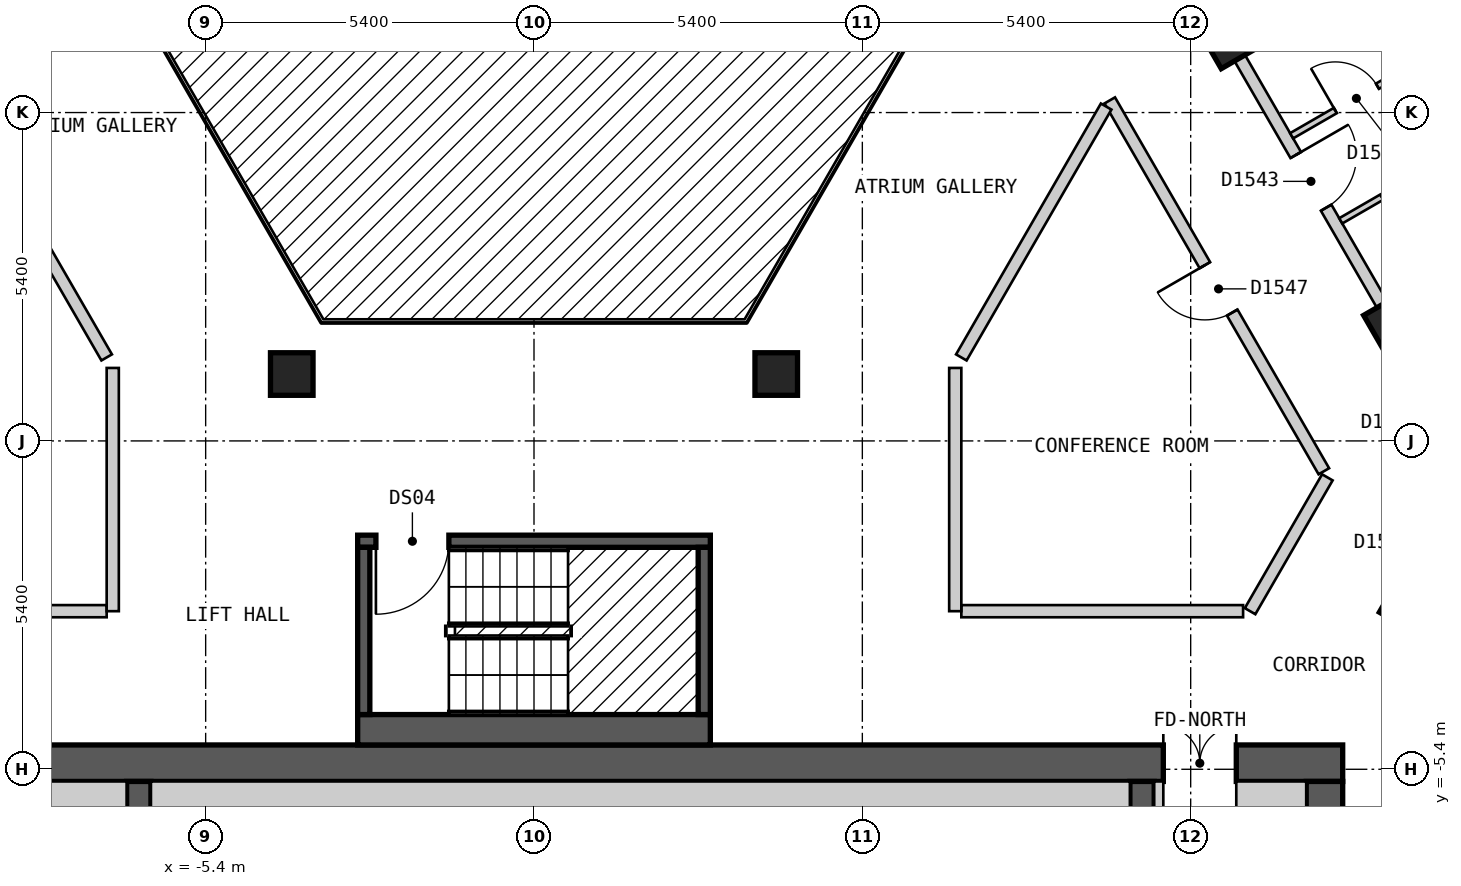
"""IFC4 building model, lengths in metres.
Left out: names, types, materials, properties, quantities, classifications, styles, units other than length and angle.
Written with IfcOpenShell. Run it as: python <this file> out.ifc"""

import sys

from ifc_helpers import new_model, si_unit, direction, frame, frame_2d, origin, origin_2d, place, context, subcontext, project, spatial, rectangle, extrude, element, fill, save


model = new_model("IFC4")
c1 = context("Model", 3, precision=1e-05, world=origin(), true_north=direction((0.0, 1.0)))
c2 = subcontext(c1, "Body", "Model", "MODEL_VIEW")
j1 = project(units=[si_unit("LENGTHUNIT", "METRE"), si_unit("PLANEANGLEUNIT", "RADIAN")], contexts=[c1])
p1 = place(None, origin())
s1 = spatial("IfcSite", under=j1, at=p1, CompositionType="ELEMENT")
p2 = place(p1, origin())
s2 = spatial("IfcBuilding", under=s1, at=p2, CompositionType="ELEMENT")
p3 = place(p2, frame((0.0, 0.0, 184.2)))
s3 = spatial("IfcBuildingStorey", under=s2, at=p3, CompositionType="ELEMENT", Elevation=184.2)
for number, where, z_axis, x_axis in (
    (1, (14.382, -2.689, 0.0), (0.0, 0.0, 1.0), (0.5, 0.866, 0.0)),
    (2, (14.123, 1.937, 0.0), (0.0, 0.0, 1.0), (-0.5, 0.866, 0.0)),
    (3, (3.984, 1.1, 0.0), (0.0, 0.0, 1.0), (1.0, 0.0, 0.0)),
    (4, (11.431, 6.6, 0.0), (0.0, 0.0, 1.0), (-0.5, 0.866, 0.0)),
    (5, (-3.984, 1.1, 0.0), (0.0, 0.0, 1.0), (1.0, 0.0, 0.0)),
):
    element("IfcColumn", number, at=place(p3, frame(where, z_axis=z_axis, x_axis=x_axis)), inside=s3, PredefinedType="COLUMN", context=c2, shape_type="SweptSolid", body=[
        extrude(rectangle(XDim=0.7, YDim=0.7, at=origin_2d()), origin(), (0.0, 0.0, 1.0), 3.0),
    ])
p4 = place(p3, frame((-13.3, -5.3, 0.0), z_axis=(0.0, 0.0, 1.0), x_axis=(1.0, 0.0, 0.0)))
e6 = element("IfcWall", 6, at=p4, inside=s3, PredefinedType="SHEAR", context=c2, shape_type="SweptSolid", body=[
    extrude(rectangle(XDim=26.6, YDim=0.6, at=frame_2d((13.3, 0.0))), origin(), (0.0, 0.0, 1.0), 2.7),
])
p5 = place(p4, frame((23.65, 0.0, 0.0)))
e7 = element("IfcOpeningElement", 7, at=p5, cuts=e6, PredefinedType="OPENING", context=c2, shape_type="SweptSolid", body=[
    extrude(rectangle(XDim=1.2, YDim=2.1, at=frame_2d((0.6, 1.05))), frame((0.0, 0.31, 0.0), z_axis=(0.0, -1.0, 0.0), x_axis=(1.0, 0.0, 0.0)), (0.0, 0.0, 1.0), 0.62),
])
p6 = place(p3, frame((13.0, -18.4, 0.0), z_axis=(0.0, 0.0, 1.0), x_axis=(0.0, 1.0, 0.0)))
e8 = element("IfcWall", 8, at=p6, inside=s3, PredefinedType="SHEAR", context=c2, shape_type="SweptSolid", body=[
    extrude(rectangle(XDim=12.8, YDim=0.6, at=frame_2d((6.4, 0.0))), origin(), (0.0, 0.0, 1.0), 2.7),
])
for number, where, z_axis, x_axis in (
    (9, (-6.5, -9.15, 0.0), (0.0, 0.0, 1.0), (0.0, 1.0, 0.0)),
    (10, (10.0, -9.15, 0.0), (0.0, 0.0, 1.0), (0.0, 1.0, 0.0)),
):
    element("IfcWall", number, at=place(p3, frame(where, z_axis=z_axis, x_axis=x_axis)), inside=s3, PredefinedType="SHEAR", context=c2, shape_type="SweptSolid", body=[
        extrude(rectangle(XDim=3.55, YDim=0.4, at=frame_2d((1.775, 0.0))), origin(), (0.0, 0.0, 1.0), 2.7),
    ])
p7 = place(p3, frame((-2.9, -4.75, 0.0), z_axis=(0.0, 0.0, 1.0), x_axis=(1.0, 0.0, 0.0)))
e11 = element("IfcWall", 11, at=p7, inside=s3, PredefinedType="SOLIDWALL", context=c2, shape_type="SweptSolid", body=[
    extrude(rectangle(XDim=5.8, YDim=0.5, at=frame_2d((2.9, 0.0))), origin(), (0.0, 0.0, 1.0), 2.7),
])
p8 = place(p3, frame((-2.9, -1.65, 0.0), z_axis=(0.0, 0.0, 1.0), x_axis=(1.0, 0.0, 0.0)))
e12 = element("IfcWall", 12, at=p8, inside=s3, PredefinedType="SOLIDWALL", context=c2, shape_type="SweptSolid", body=[
    extrude(rectangle(XDim=5.8, YDim=0.2, at=frame_2d((2.9, 0.0))), origin(), (0.0, 0.0, 1.0), 2.7),
])
p9 = place(p8, frame((0.3, 0.0, 0.0)))
e13 = element("IfcOpeningElement", 13, at=p9, cuts=e12, PredefinedType="OPENING", context=c2, shape_type="SweptSolid", body=[
    extrude(rectangle(XDim=1.2, YDim=2.1, at=frame_2d((0.6, 1.05))), frame((0.0, 0.11, 0.0), z_axis=(0.0, -1.0, 0.0), x_axis=(1.0, 0.0, 0.0)), (0.0, 0.0, 1.0), 0.22),
])
for number, where, z_axis, x_axis in (
    (14, (-2.8, -4.5, 0.0), (0.0, 0.0, 1.0), (0.0, 1.0, 0.0)),
    (15, (2.8, -4.5, 0.0), (0.0, 0.0, 1.0), (0.0, 1.0, 0.0)),
):
    element("IfcWall", number, at=place(p3, frame(where, z_axis=z_axis, x_axis=x_axis)), inside=s3, PredefinedType="SOLIDWALL", context=c2, shape_type="SweptSolid", body=[
        extrude(rectangle(XDim=2.75, YDim=0.2, at=frame_2d((1.375, 0.0))), origin(), (0.0, 0.0, 1.0), 2.7),
    ])
p10 = place(p3, frame((-9.411, 5.5, 0.0), z_axis=(0.0, 0.0, 1.0), x_axis=(0.500018099276, -0.86601495391, 0.0)))
e16 = element("IfcWall", 16, at=p10, inside=s3, PredefinedType="PARTITIONING", context=c2, shape_type="SweptSolid", body=[
    extrude(rectangle(XDim=4.765, YDim=0.2, at=frame_2d((2.383, 0.0))), origin(), (0.0, 0.0, 1.0), 2.7),
])
p11 = place(p3, frame((9.469, 5.6, 0.0), z_axis=(0.0, 0.0, 1.0), x_axis=(0.499964524401, -0.866045884662, 0.0)))
e17 = element("IfcWall", 17, at=p11, inside=s3, PredefinedType="PARTITIONING", context=c2, shape_type="SweptSolid", body=[
    extrude(rectangle(XDim=7.042, YDim=0.2, at=frame_2d((3.521, 0.0))), origin(), (0.0, 0.0, 1.0), 2.7),
])
p12 = place(p11, frame((3.129, 0.0, 0.0)))
e18 = element("IfcOpeningElement", 18, at=p12, cuts=e17, PredefinedType="OPENING", context=c2, shape_type="SweptSolid", body=[
    extrude(rectangle(XDim=0.9, YDim=2.1, at=frame_2d((0.45, 1.05))), frame((0.0, 0.11, 0.0), z_axis=(0.0, -1.0, 0.0), x_axis=(1.0, 0.0, 0.0)), (0.0, 0.0, 1.0), 0.22),
])
p13 = place(p3, frame((10.739, 7.8, 0.0), z_axis=(0.0, 0.0, 1.0), x_axis=(0.500023726918, -0.866011704609, 0.0)))
e19 = element("IfcWall", 19, at=p13, inside=s3, PredefinedType="PARTITIONING", context=c2, shape_type="SweptSolid", body=[
    extrude(rectangle(XDim=9.47, YDim=0.2, at=frame_2d((4.735, 0.0))), origin(), (0.0, 0.0, 1.0), 2.7),
])
p14 = place(p13, frame((8.168, 0.0, 0.0)))
e20 = element("IfcOpeningElement", 20, at=p14, cuts=e19, PredefinedType="OPENING", context=c2, shape_type="SweptSolid", body=[
    extrude(rectangle(XDim=1.0, YDim=2.1, at=frame_2d((0.5, 1.05))), frame((0.0, 0.11, 0.0), z_axis=(0.0, -1.0, 0.0), x_axis=(1.0, 0.0, 0.0)), (0.0, 0.0, 1.0), 0.22),
])
p15 = place(p13, frame((3.578, 0.0, 0.0)))
e21 = element("IfcOpeningElement", 21, at=p15, cuts=e19, PredefinedType="OPENING", context=c2, shape_type="SweptSolid", body=[
    extrude(rectangle(XDim=1.0, YDim=2.1, at=frame_2d((0.5, 1.05))), frame((0.0, 0.11, 0.0), z_axis=(0.0, -1.0, 0.0), x_axis=(1.0, 0.0, 0.0)), (0.0, 0.0, 1.0), 0.22),
])
p16 = place(p3, frame((-11.778, -2.8, 0.0), z_axis=(0.0, 0.0, 1.0), x_axis=(1.0, 0.0, 0.0)))
e22 = element("IfcWall", 22, at=p16, inside=s3, PredefinedType="PARTITIONING", context=c2, shape_type="SweptSolid", body=[
    extrude(rectangle(XDim=4.75, YDim=0.2, at=frame_2d((2.375, 0.0))), origin(), (0.0, 0.0, 1.0), 2.7),
])
p17 = place(p3, frame((7.028, -2.8, 0.0), z_axis=(0.0, 0.0, 1.0), x_axis=(1.0, 0.0, 0.0)))
e23 = element("IfcWall", 23, at=p17, inside=s3, PredefinedType="PARTITIONING", context=c2, shape_type="SweptSolid", body=[
    extrude(rectangle(XDim=4.634, YDim=0.2, at=frame_2d((2.317, 0.0))), origin(), (0.0, 0.0, 1.0), 2.7),
])
p18 = place(p3, frame((7.028, 1.373, 0.0), z_axis=(0.0, 0.0, 1.0), x_axis=(0.499953126767, 0.866052464367, 0.0)))
e24 = element("IfcWall", 24, at=p18, inside=s3, PredefinedType="PARTITIONING", context=c2, shape_type="SweptSolid", body=[
    extrude(rectangle(XDim=4.764, YDim=0.2, at=frame_2d((2.382, 0.0))), origin(), (0.0, 0.0, 1.0), 2.7),
])
p19 = place(p3, frame((11.777, -2.8, 0.0), z_axis=(0.0, 0.0, 1.0), x_axis=(0.500085537782, 0.86597601289, 0.0)))
e25 = element("IfcWall", 25, at=p19, inside=s3, PredefinedType="PARTITIONING", context=c2, shape_type="SweptSolid", body=[
    extrude(rectangle(XDim=2.542, YDim=0.2, at=frame_2d((1.271, 0.0))), origin(), (0.0, 0.0, 1.0), 2.7),
])
for number, where, z_axis, x_axis in (
    (26, (6.928, -2.8, 0.0), (0.0, 0.0, 1.0), (0.0, 1.0, 0.0)),
    (27, (-6.928, -2.8, 0.0), (0.0, 0.0, 1.0), (0.0, 1.0, 0.0)),
):
    element("IfcWall", number, at=place(p3, frame(where, z_axis=z_axis, x_axis=x_axis)), inside=s3, PredefinedType="PARTITIONING", context=c2, shape_type="SweptSolid", body=[
        extrude(rectangle(XDim=4.0, YDim=0.2, at=frame_2d((2.0, 0.0))), origin(), (0.0, 0.0, 1.0), 2.7),
    ])
p20 = place(p3, frame((13.785, 7.844, 0.0), z_axis=(0.0, 0.0, 1.0), x_axis=(0.500176784828, -0.865923312955, 0.0)))
e28 = element("IfcWall", 28, at=p20, inside=s3, PredefinedType="PARTITIONING", context=c2, shape_type="SweptSolid", body=[
    extrude(rectangle(XDim=3.349, YDim=0.1, at=frame_2d((1.674, 0.0))), origin(), (0.0, 0.0, 1.0), 2.7),
])
p21 = place(p3, frame((13.268, 3.619, 0.0), z_axis=(0.0, 0.0, 1.0), x_axis=(0.865902724456, 0.500212426655, 0.0)))
e29 = element("IfcWall", 29, at=p21, inside=s3, PredefinedType="PARTITIONING", context=c2, shape_type="SweptSolid", body=[
    extrude(rectangle(XDim=2.559, YDim=0.1, at=frame_2d((1.28, 0.0))), origin(), (0.0, 0.0, 1.0), 2.7),
])
p22 = place(p21, frame((0.78, 0.0, 0.0)))
e30 = element("IfcOpeningElement", 30, at=p22, cuts=e29, PredefinedType="OPENING", context=c2, shape_type="SweptSolid", body=[
    extrude(rectangle(XDim=0.9, YDim=2.1, at=frame_2d((0.45, 1.05))), frame((0.0, 0.06, 0.0), z_axis=(0.0, -1.0, 0.0), x_axis=(1.0, 0.0, 0.0)), (0.0, 0.0, 1.0), 0.12),
])
p23 = place(p3, frame((12.46, 5.018, 0.0), z_axis=(0.0, 0.0, 1.0), x_axis=(0.866080321209, 0.499904868165, 0.0)))
e31 = element("IfcWall", 31, at=p23, inside=s3, PredefinedType="PARTITIONING", context=c2, shape_type="SweptSolid", body=[
    extrude(rectangle(XDim=2.51, YDim=0.1, at=frame_2d((1.255, 0.0))), origin(), (0.0, 0.0, 1.0), 2.7),
])
p24 = place(p23, frame((0.83, 0.0, 0.0)))
e32 = element("IfcOpeningElement", 32, at=p24, cuts=e31, PredefinedType="OPENING", context=c2, shape_type="SweptSolid", body=[
    extrude(rectangle(XDim=0.8, YDim=2.1, at=frame_2d((0.4, 1.05))), frame((0.0, 0.06, 0.0), z_axis=(0.0, -1.0, 0.0), x_axis=(1.0, 0.0, 0.0)), (0.0, 0.0, 1.0), 0.12),
])
p25 = place(p3, frame((-12.1, -5.9, 0.0), z_axis=(0.0, 0.0, 1.0), x_axis=(1.0, 0.0, 0.0)))
e33 = element("IfcWall", 33, at=p25, inside=s3, PredefinedType="SOLIDWALL", context=c2, shape_type="SweptSolid", body=[
    extrude(rectangle(XDim=5.4, YDim=0.6, at=frame_2d((2.7, 0.0))), origin(), (0.0, 0.0, 1.0), 2.7),
])
p26 = place(p3, frame((-6.3, -5.9, 0.0), z_axis=(0.0, 0.0, 1.0), x_axis=(1.0, 0.0, 0.0)))
e34 = element("IfcWall", 34, at=p26, inside=s3, PredefinedType="SOLIDWALL", context=c2, shape_type="SweptSolid", body=[
    extrude(rectangle(XDim=16.1, YDim=0.6, at=frame_2d((8.05, 0.0))), origin(), (0.0, 0.0, 1.0), 2.7),
])
p27 = place(p3, frame((10.275, -6.2, 0.0), z_axis=(0.0, 0.0, 1.0), x_axis=(0.0, 1.0, 0.0)))
e35 = element("IfcWall", 35, at=p27, inside=s3, PredefinedType="PARTITIONING", context=c2, shape_type="SweptSolid", body=[
    extrude(rectangle(XDim=0.6, YDim=0.15, at=frame_2d((0.3, 0.0))), origin(), (0.0, 0.0, 1.0), 2.7),
])
p28 = place(p3, frame((11.55, -5.9, 0.0), z_axis=(0.0, 0.0, 1.0), x_axis=(1.0, 0.0, 0.0)))
e36 = element("IfcWall", 36, at=p28, inside=s3, PredefinedType="PARTITIONING", context=c2, shape_type="SweptSolid", body=[
    extrude(rectangle(XDim=1.15, YDim=0.6, at=frame_2d((0.575, 0.0))), origin(), (0.0, 0.0, 1.0), 2.7),
])
p29 = place(p9, origin())
e37 = element("IfcDoor", 37, at=p29, inside=s3, OperationType="SINGLE_SWING_LEFT", PredefinedType="DOOR", context=c2, shape_type="SweptSolid", body=[
    extrude(rectangle(XDim=1.2, YDim=2.1, at=frame_2d((0.6, 1.05))), frame((0.0, 0.025, 0.0), z_axis=(0.0, -1.0, 0.0), x_axis=(1.0, 0.0, 0.0)), (0.0, 0.0, 1.0), 0.05),
])
fill(e13, e37)
p30 = place(p15, origin())
e38 = element("IfcDoor", 38, at=p30, inside=s3, OperationType="SINGLE_SWING_LEFT", PredefinedType="DOOR", context=c2, shape_type="SweptSolid", body=[
    extrude(rectangle(XDim=1.0, YDim=2.1, at=frame_2d((0.5, 1.05))), frame((0.0, 0.025, 0.0), z_axis=(0.0, -1.0, 0.0), x_axis=(1.0, 0.0, 0.0)), (0.0, 0.0, 1.0), 0.05),
])
fill(e21, e38)
p31 = place(p22, origin())
e39 = element("IfcDoor", 39, at=p31, inside=s3, OperationType="SINGLE_SWING_RIGHT", PredefinedType="DOOR", context=c2, shape_type="SweptSolid", body=[
    extrude(rectangle(XDim=0.9, YDim=2.1, at=frame_2d((0.45, 1.05))), frame((0.0, 0.025, 0.0), z_axis=(0.0, -1.0, 0.0), x_axis=(1.0, 0.0, 0.0)), (0.0, 0.0, 1.0), 0.05),
])
fill(e30, e39)
p32 = place(p24, origin())
e40 = element("IfcDoor", 40, at=p32, inside=s3, OperationType="SINGLE_SWING_LEFT", PredefinedType="DOOR", context=c2, shape_type="SweptSolid", body=[
    extrude(rectangle(XDim=0.8, YDim=2.1, at=frame_2d((0.4, 1.05))), frame((0.0, 0.025, 0.0), z_axis=(0.0, -1.0, 0.0), x_axis=(1.0, 0.0, 0.0)), (0.0, 0.0, 1.0), 0.05),
])
fill(e32, e40)
p33 = place(p12, origin())
e41 = element("IfcDoor", 41, at=p33, inside=s3, OperationType="SINGLE_SWING_LEFT", PredefinedType="DOOR", context=c2, shape_type="SweptSolid", body=[
    extrude(rectangle(XDim=0.9, YDim=2.1, at=frame_2d((0.45, 1.05))), frame((0.0, 0.025, 0.0), z_axis=(0.0, -1.0, 0.0), x_axis=(1.0, 0.0, 0.0)), (0.0, 0.0, 1.0), 0.05),
])
fill(e18, e41)
p34 = place(p5, origin())
e42 = element("IfcDoor", 42, at=p34, inside=s3, OperationType="DOUBLE_DOOR_SINGLE_SWING", PredefinedType="DOOR", context=c2, shape_type="SweptSolid", body=[
    extrude(rectangle(XDim=1.2, YDim=2.1, at=frame_2d((0.6, 1.05))), frame((0.0, 0.025, 0.0), z_axis=(0.0, -1.0, 0.0), x_axis=(1.0, 0.0, 0.0)), (0.0, 0.0, 1.0), 0.05),
])
fill(e7, e42)
save(model, sys.argv[1])
